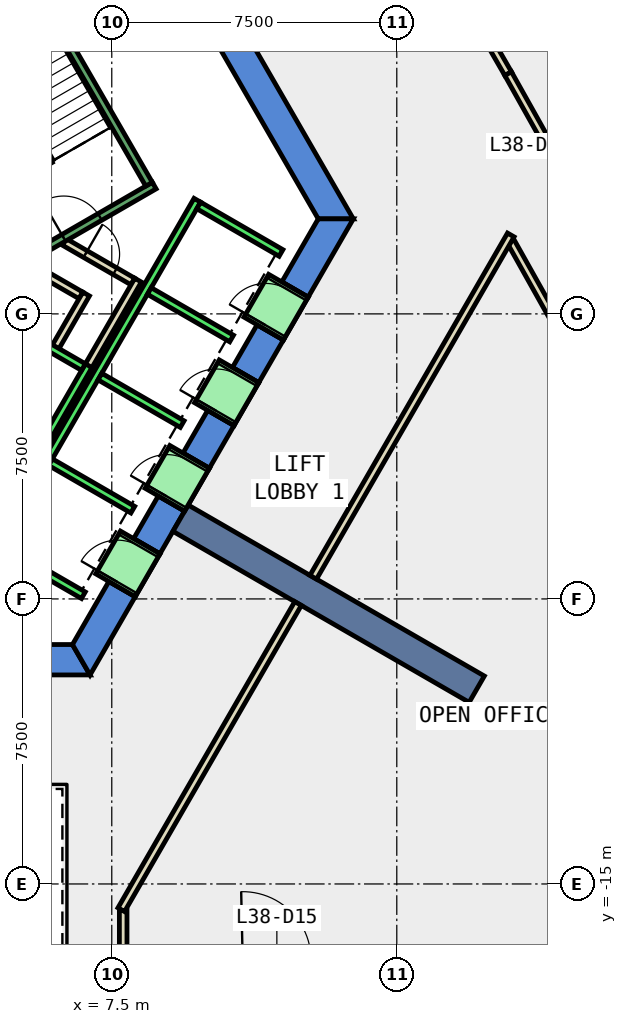
"""IFC4 building model, lengths in metres.
Left out: names, types, materials, properties, quantities, classifications, styles, units other than length and angle.
Written with IfcOpenShell. Run it as: python <this file> out.ifc"""

import sys

from ifc_helpers import new_model, si_unit, direction, frame, frame_2d, origin, place, context, subcontext, project, spatial, polyline, rectangle, outline, extrude, element, fill, save


model = new_model("IFC4")
c1 = context("Model", 3, precision=1e-05, world=origin(), true_north=direction((0.0, 1.0)))
c2 = subcontext(c1, "Body", "Model", "MODEL_VIEW")
j1 = project(units=[si_unit("LENGTHUNIT", "METRE"), si_unit("PLANEANGLEUNIT", "RADIAN")], contexts=[c1])
p1 = place(None, origin())
s1 = spatial("IfcSite", under=j1, at=p1, CompositionType="ELEMENT")
p2 = place(p1, origin())
s2 = spatial("IfcBuilding", under=s1, at=p2, CompositionType="ELEMENT")
p3 = place(p2, frame((0.0, 0.0, 171.8)))
s3 = spatial("IfcBuildingStorey", under=s2, at=p3, CompositionType="ELEMENT", Elevation=171.8)
p4 = place(p3, frame((0.0, 0.0, -0.4)))
e1 = element("IfcWall", 1, at=p4, inside=s3, PredefinedType="SHEAR", context=c2, shape_type="SweptSolid", body=[
    extrude(outline(polyline([(8.517, 11.748), (7.824, 11.348), (12.933, 2.5), (13.856, 2.5), (8.517, 11.748)])), origin(), (0.0, 0.0, 1.0), 4.2),
])
p5 = place(p3, frame((0.0, 0.0, -0.4)))
e2 = element("IfcWall", 2, at=p5, inside=s3, PredefinedType="SHEAR", context=c2, shape_type="SweptSolid", body=[
    extrude(outline(polyline([(5.75, -8.7), (5.75, -9.5), (6.928, -9.5), (6.466, -8.7), (5.75, -8.7)])), origin(), (0.0, 0.0, 1.0), 4.2),
])
p6 = place(p3, frame((0.0, 0.0, -0.4)))
e3 = element("IfcWall", 3, at=p6, inside=s3, PredefinedType="SHEAR", context=c2, shape_type="SweptSolid", body=[
    extrude(outline(polyline([(8.117, -7.44), (7.424, -7.04), (6.466, -8.7), (6.928, -9.5), (8.117, -7.44)])), origin(), (0.0, 0.0, 1.0), 4.2),
])
p7 = place(p3, frame((0.0, 0.0, -0.4)))
e4 = element("IfcWall", 4, at=p7, inside=s3, PredefinedType="SHEAR", context=c2, shape_type="SweptSolid", body=[
    extrude(outline(polyline([(9.417, -5.189), (8.724, -4.789), (8.075, -5.914), (8.767, -6.314), (9.417, -5.189)])), origin(), (0.0, 0.0, 1.0), 4.2),
])
p8 = place(p3, frame((0.0, 0.0, -0.4)))
e5 = element("IfcWall", 5, at=p8, inside=s3, PredefinedType="SHEAR", context=c2, shape_type="SweptSolid", body=[
    extrude(outline(polyline([(10.717, -2.937), (10.025, -2.537), (9.374, -3.663), (10.067, -4.063), (10.717, -2.937)])), origin(), (0.0, 0.0, 1.0), 4.2),
])
p9 = place(p3, frame((0.0, 0.0, -0.4)))
e6 = element("IfcWall", 6, at=p9, inside=s3, PredefinedType="SHEAR", context=c2, shape_type="SweptSolid", body=[
    extrude(outline(polyline([(12.017, -0.686), (11.324, -0.286), (10.675, -1.411), (11.367, -1.811), (12.017, -0.686)])), origin(), (0.0, 0.0, 1.0), 4.2),
])
p10 = place(p3, frame((0.0, 0.0, -0.4)))
e7 = element("IfcWall", 7, at=p10, inside=s3, PredefinedType="SHEAR", context=c2, shape_type="SweptSolid", body=[
    extrude(outline(polyline([(11.974, 0.84), (12.667, 0.44), (13.856, 2.5), (12.933, 2.5), (11.974, 0.84)])), origin(), (0.0, 0.0, 1.0), 4.2),
])
p11 = place(p3, frame((0.0, 0.0, 3.6)))
e8 = element("IfcWall", 8, at=p11, inside=s3, PredefinedType="SHEAR", context=c2, shape_type="SweptSolid", body=[
    extrude(outline(polyline([(8.767, -6.314), (8.075, -5.914), (7.424, -7.04), (8.117, -7.44), (8.767, -6.314)])), origin(), (0.0, 0.0, 1.0), 0.2),
])
p12 = place(p3, frame((0.0, 0.0, 3.6)))
e9 = element("IfcWall", 9, at=p12, inside=s3, PredefinedType="SHEAR", context=c2, shape_type="SweptSolid", body=[
    extrude(outline(polyline([(10.067, -4.063), (9.374, -3.663), (8.724, -4.789), (9.417, -5.189), (10.067, -4.063)])), origin(), (0.0, 0.0, 1.0), 0.2),
])
p13 = place(p3, frame((0.0, 0.0, 3.6)))
e10 = element("IfcWall", 10, at=p13, inside=s3, PredefinedType="SHEAR", context=c2, shape_type="SweptSolid", body=[
    extrude(outline(polyline([(11.367, -1.811), (10.675, -1.411), (10.025, -2.537), (10.717, -2.937), (11.367, -1.811)])), origin(), (0.0, 0.0, 1.0), 0.2),
])
p14 = place(p3, frame((0.0, 0.0, 3.6)))
e11 = element("IfcWall", 11, at=p14, inside=s3, PredefinedType="SHEAR", context=c2, shape_type="SweptSolid", body=[
    extrude(outline(polyline([(12.667, 0.44), (11.974, 0.84), (11.324, -0.286), (12.017, -0.686), (12.667, 0.44)])), origin(), (0.0, 0.0, 1.0), 0.2),
])
p15 = place(p3, frame((9.31, -5.375, -0.4), z_axis=(0.0, 0.0, 1.0), x_axis=(0.866017533419, -0.500013631625, 0.0)))
e12 = element("IfcWall", 12, at=p15, inside=s3, PredefinedType="SHEAR", context=c2, shape_type="SweptSolid", body=[
    extrude(rectangle(XDim=9.0, YDim=0.8, at=frame_2d((4.5, 0.0))), origin(), (0.0, 0.0, 1.0), 4.2),
])
p16 = place(p3, frame((15.987, -16.893, 0.0), z_axis=(0.0, 0.0, 1.0), x_axis=(0.999316060953, 0.036978511606, 0.0)))
e13 = element("IfcWall", 13, at=p16, inside=s3, PredefinedType="PARTITIONING", context=c2, shape_type="SweptSolid", body=[
    extrude(rectangle(XDim=7.355, YDim=0.2, at=frame_2d((3.677, 0.0))), origin(), (0.0, 0.0, 1.0), 3.8),
])
p17 = place(p3, frame((19.506, -0.785, 0.0), z_axis=(0.0, 0.0, 1.0), x_axis=(-0.489049603292, 0.872255974769, 0.0)))
e14 = element("IfcWall", 14, at=p17, inside=s3, PredefinedType="PARTITIONING", context=c2, shape_type="SweptSolid", body=[
    extrude(rectangle(XDim=3.082, YDim=0.2, at=frame_2d((1.541, 0.0))), origin(), (0.0, 0.0, 1.0), 3.8),
])
p18 = place(p3, frame((16.222, 9.28, 0.0), z_axis=(0.0, 0.0, 1.0), x_axis=(0.499920397431, -0.866071357471, 0.0)))
e15 = element("IfcWall", 15, at=p18, inside=s3, PredefinedType="PARTITIONING", context=c2, shape_type="SweptSolid", body=[
    extrude(rectangle(XDim=3.417, YDim=0.2, at=frame_2d((1.708, 0.0))), origin(), (0.0, 0.0, 1.0), 3.8),
])
p19 = place(p3, frame((17.93, 6.321, 0.0), z_axis=(0.0, 0.0, 1.0), x_axis=(0.489044053781, -0.872259086202, 0.0)))
e16 = element("IfcWall", 16, at=p19, inside=s3, PredefinedType="PARTITIONING", context=c2, shape_type="SweptSolid", body=[
    extrude(rectangle(XDim=6.983, YDim=0.2, at=frame_2d((3.492, 0.0))), origin(), (0.0, 0.0, 1.0), 3.8),
])
p20 = place(p19, frame((2.991, 0.0, 0.0)))
e17 = element("IfcOpeningElement", 17, at=p20, cuts=e16, PredefinedType="OPENING", context=c2, shape_type="SweptSolid", body=[
    extrude(rectangle(XDim=1.0, YDim=2.1, at=frame_2d((0.5, 1.05))), frame((0.0, 0.11, 0.0), z_axis=(0.0, -1.0, 0.0), x_axis=(1.0, 0.0, 0.0)), (0.0, 0.0, 1.0), 0.22),
])
p21 = place(p3, frame((5.499, 1.172, 0.0), z_axis=(0.0, 0.0, 1.0), x_axis=(0.866333505267, -0.499465972466, 0.0)))
e18 = element("IfcWall", 18, at=p21, inside=s3, PredefinedType="PARTITIONING", context=c2, shape_type="SweptSolid", body=[
    extrude(rectangle(XDim=1.374, YDim=0.2, at=frame_2d((0.687, 0.0))), origin(), (0.0, 0.0, 1.0), 3.8),
])
p22 = place(p3, frame((6.826, 0.522, 0.0), z_axis=(0.0, 0.0, 1.0), x_axis=(-0.500016722714, -0.866015748706, 0.0)))
e19 = element("IfcWall", 19, at=p22, inside=s3, PredefinedType="PARTITIONING", context=c2, shape_type="SweptSolid", body=[
    extrude(rectangle(XDim=1.7, YDim=0.2, at=frame_2d((0.85, 0.0))), origin(), (0.0, 0.0, 1.0), 3.8),
])
p23 = place(p3, frame((6.25, 1.894, 0.0), z_axis=(0.0, 0.0, 1.0), x_axis=(0.866043184279, -0.499969202016, 0.0)))
e20 = element("IfcWall", 20, at=p23, inside=s3, PredefinedType="PARTITIONING", context=c2, shape_type="SweptSolid", body=[
    extrude(rectangle(XDim=2.084, YDim=0.2, at=frame_2d((1.042, 0.0))), origin(), (0.0, 0.0, 1.0), 3.8),
])
p24 = place(p23, frame((0.642, 0.0, 0.0)))
e21 = element("IfcOpeningElement", 21, at=p24, cuts=e20, PredefinedType="OPENING", context=c2, shape_type="SweptSolid", body=[
    extrude(rectangle(XDim=0.9, YDim=2.1, at=frame_2d((0.45, 1.05))), frame((0.0, 0.11, 0.0), z_axis=(0.0, -1.0, 0.0), x_axis=(1.0, 0.0, 0.0)), (0.0, 0.0, 1.0), 0.22),
])
p25 = place(p3, frame((8.192, 0.888, 0.0), z_axis=(0.0, 0.0, 1.0), x_axis=(-0.499940625693, -0.866059680843, 0.0)))
e22 = element("IfcWall", 22, at=p25, inside=s3, PredefinedType="PARTITIONING", context=c2, shape_type="SweptSolid", body=[
    extrude(rectangle(XDim=2.68, YDim=0.2, at=frame_2d((1.34, 0.0))), origin(), (0.0, 0.0, 1.0), 3.8),
])
p26 = place(p3, frame((7.8, -15.69, 0.0), z_axis=(0.0, 0.0, 1.0), x_axis=(0.0, -1.0, 0.0)))
e23 = element("IfcWall", 23, at=p26, inside=s3, PredefinedType="PARTITIONING", context=c2, shape_type="SweptSolid", body=[
    extrude(rectangle(XDim=1.281, YDim=0.2, at=frame_2d((0.641, 0.0))), origin(), (0.0, 0.0, 1.0), 3.8),
])
p27 = place(p3, frame((18.0, 2.077, 0.0), z_axis=(0.0, 0.0, 1.0), x_axis=(-0.499959557847, -0.866048751813, 0.0)))
e24 = element("IfcWall", 24, at=p27, inside=s3, PredefinedType="PARTITIONING", context=c2, shape_type="SweptSolid", body=[
    extrude(rectangle(XDim=10.399, YDim=0.2, at=frame_2d((5.199, 0.0))), origin(), (0.0, 0.0, 1.0), 3.8),
])
p28 = place(p3, frame((12.401, -7.621, 0.0), z_axis=(0.0, 0.0, 1.0), x_axis=(-0.499983724212, -0.866034800411, 0.0)))
e25 = element("IfcWall", 25, at=p28, inside=s3, PredefinedType="PARTITIONING", context=c2, shape_type="SweptSolid", body=[
    extrude(rectangle(XDim=9.302, YDim=0.2, at=frame_2d((4.651, 0.0))), origin(), (0.0, 0.0, 1.0), 3.8),
])
p29 = place(p3, frame((5.492, -3.788, 0.0), z_axis=(0.0, 0.0, 1.0), x_axis=(0.500011755427, 0.866018616679, 0.0)))
e26 = element("IfcWall", 26, at=p29, inside=s3, PredefinedType="STANDARD", context=c2, shape_type="SweptSolid", body=[
    extrude(rectangle(XDim=2.8, YDim=0.2, at=frame_2d((1.4, 0.0))), origin(), (0.0, 0.0, 1.0), 3.8),
])
p30 = place(p3, frame((4.677, -0.2, 0.0), z_axis=(0.0, 0.0, 1.0), x_axis=(0.865973769406, -0.500089422704, 0.0)))
e27 = element("IfcWall", 27, at=p30, inside=s3, PredefinedType="STANDARD", context=c2, shape_type="SweptSolid", body=[
    extrude(rectangle(XDim=2.399, YDim=0.2, at=frame_2d((1.2, 0.0))), origin(), (0.0, 0.0, 1.0), 3.8),
])
p31 = place(p3, frame((4.451, -6.19, 0.0), z_axis=(0.0, 0.0, 1.0), x_axis=(0.50000090737, 0.866024879913, 0.0)))
e28 = element("IfcWall", 28, at=p31, inside=s3, PredefinedType="STANDARD", context=c2, shape_type="SweptSolid", body=[
    extrude(rectangle(XDim=10.6, YDim=0.2, at=frame_2d((5.3, 0.0))), origin(), (0.0, 0.0, 1.0), 3.8),
])
for number, where, z_axis, x_axis in (
    (29, (4.588, -6.153, 0.0), (0.0, 0.0, 1.0), (0.866, -0.5, 0.0)),
    (30, (5.888, -3.902, 0.0), (0.0, 0.0, 1.0), (0.866, -0.5, 0.0)),
    (31, (7.188, -1.65, 0.0), (0.0, 0.0, 1.0), (0.866, -0.5, 0.0)),
    (32, (8.488, 0.602, 0.0), (0.0, 0.0, 1.0), (0.866, -0.5, 0.0)),
):
    element("IfcWall", number, at=place(p3, frame(where, z_axis=z_axis, x_axis=x_axis)), inside=s3, PredefinedType="STANDARD", context=c2, shape_type="SweptSolid", body=[
        extrude(rectangle(XDim=2.5, YDim=0.2, at=frame_2d((1.25, 0.0))), origin(), (0.0, 0.0, 1.0), 3.8),
    ])
p32 = place(p3, frame((9.788, 2.853, 0.0), z_axis=(0.0, 0.0, 1.0), x_axis=(0.865998541277, -0.500046524342, 0.0)))
e33 = element("IfcWall", 33, at=p32, inside=s3, PredefinedType="STANDARD", context=c2, shape_type="SweptSolid", body=[
    extrude(rectangle(XDim=2.5, YDim=0.2, at=frame_2d((1.25, 0.0))), origin(), (0.0, 0.0, 1.0), 3.8),
])
p33 = place(p3, frame((7.598, -7.14, 0.0), z_axis=(0.0, 0.0, 1.0), x_axis=(0.500362116554, 0.865816234728, 0.0)))
e34 = element("IfcWall", 34, at=p33, inside=s3, PredefinedType="STANDARD", context=c2, shape_type="SweptSolid", body=[
    extrude(rectangle(XDim=1.299, YDim=1.2, at=frame_2d((0.65, 0.0))), origin(), (0.0, 0.0, 1.0), 2.4),
])
p34 = place(p33, frame((0.1, 0.0, 0.0)))
e35 = element("IfcOpeningElement", 35, at=p34, cuts=e34, PredefinedType="OPENING", context=c2, shape_type="SweptSolid", body=[
    extrude(rectangle(XDim=1.1, YDim=2.3, at=frame_2d((0.55, 1.15))), frame((0.0, 0.61, 0.0), z_axis=(0.0, -1.0, 0.0), x_axis=(1.0, 0.0, 0.0)), (0.0, 0.0, 1.0), 1.22),
])
p35 = place(p3, frame((8.898, -4.889, 0.0), z_axis=(0.0, 0.0, 1.0), x_axis=(0.500036693733, 0.866004217611, 0.0)))
e36 = element("IfcWall", 36, at=p35, inside=s3, PredefinedType="STANDARD", context=c2, shape_type="SweptSolid", body=[
    extrude(rectangle(XDim=1.3, YDim=1.2, at=frame_2d((0.65, 0.0))), origin(), (0.0, 0.0, 1.0), 2.4),
])
p36 = place(p35, frame((0.1, 0.0, 0.0)))
e37 = element("IfcOpeningElement", 37, at=p36, cuts=e36, PredefinedType="OPENING", context=c2, shape_type="SweptSolid", body=[
    extrude(rectangle(XDim=1.1, YDim=2.3, at=frame_2d((0.55, 1.15))), frame((0.0, 0.61, 0.0), z_axis=(0.0, -1.0, 0.0), x_axis=(1.0, 0.0, 0.0)), (0.0, 0.0, 1.0), 1.22),
])
p37 = place(p3, frame((10.198, -2.637, 0.0), z_axis=(0.0, 0.0, 1.0), x_axis=(0.49989585183, 0.866085525409, 0.0)))
e38 = element("IfcWall", 38, at=p37, inside=s3, PredefinedType="STANDARD", context=c2, shape_type="SweptSolid", body=[
    extrude(rectangle(XDim=1.3, YDim=1.2, at=frame_2d((0.65, 0.0))), origin(), (0.0, 0.0, 1.0), 2.4),
])
p38 = place(p37, frame((0.1, 0.0, 0.0)))
e39 = element("IfcOpeningElement", 39, at=p38, cuts=e38, PredefinedType="OPENING", context=c2, shape_type="SweptSolid", body=[
    extrude(rectangle(XDim=1.1, YDim=2.3, at=frame_2d((0.55, 1.15))), frame((0.0, 0.61, 0.0), z_axis=(0.0, -1.0, 0.0), x_axis=(1.0, 0.0, 0.0)), (0.0, 0.0, 1.0), 1.22),
])
p39 = place(p3, frame((11.498, -0.385, 0.0), z_axis=(0.0, 0.0, 1.0), x_axis=(0.500221244143, 0.865897630733, 0.0)))
e40 = element("IfcWall", 40, at=p39, inside=s3, PredefinedType="STANDARD", context=c2, shape_type="SweptSolid", body=[
    extrude(rectangle(XDim=1.299, YDim=1.2, at=frame_2d((0.65, 0.0))), origin(), (0.0, 0.0, 1.0), 2.4),
])
p40 = place(p39, frame((0.1, 0.0, 0.0)))
e41 = element("IfcOpeningElement", 41, at=p40, cuts=e40, PredefinedType="OPENING", context=c2, shape_type="SweptSolid", body=[
    extrude(rectangle(XDim=1.1, YDim=2.3, at=frame_2d((0.55, 1.15))), frame((0.0, 0.61, 0.0), z_axis=(0.0, -1.0, 0.0), x_axis=(1.0, 0.0, 0.0)), (0.0, 0.0, 1.0), 1.22),
])
p41 = place(p3, frame((4.806, 1.176, 0.0), z_axis=(0.0, 0.0, 1.0), x_axis=(0.866059941101, 0.499940174841, 0.0)))
e42 = element("IfcWall", 42, at=p41, inside=s3, PredefinedType="STANDARD", context=c2, shape_type="SweptSolid", body=[
    extrude(rectangle(XDim=4.4, YDim=0.2, at=frame_2d((2.2, 0.0))), origin(), (0.0, 0.0, 1.0), 3.8),
])
p42 = place(p41, frame((1.65, 0.0, 0.0)))
e43 = element("IfcOpeningElement", 43, at=p42, cuts=e42, PredefinedType="OPENING", context=c2, shape_type="SweptSolid", body=[
    extrude(rectangle(XDim=1.1, YDim=2.2, at=frame_2d((0.55, 1.1))), frame((0.0, 0.11, 0.0), z_axis=(0.0, -1.0, 0.0), x_axis=(1.0, 0.0, 0.0)), (0.0, 0.0, 1.0), 0.22),
])
p43 = place(p3, frame((8.48, 3.412, 0.0), z_axis=(0.0, 0.0, 1.0), x_axis=(-0.499978703459, 0.866037698999, 0.0)))
e44 = element("IfcWall", 44, at=p43, inside=s3, PredefinedType="STANDARD", context=c2, shape_type="SweptSolid", body=[
    extrude(rectangle(XDim=6.9, YDim=0.2, at=frame_2d((3.45, 0.0))), origin(), (0.0, 0.0, 1.0), 3.8),
])
p44 = place(p24, origin())
e45 = element("IfcDoor", 45, at=p44, inside=s3, OperationType="SINGLE_SWING_LEFT", PredefinedType="DOOR", context=c2, shape_type="SweptSolid", body=[
    extrude(rectangle(XDim=0.9, YDim=2.1, at=frame_2d((0.45, 1.05))), frame((0.0, 0.025, 0.0), z_axis=(0.0, -1.0, 0.0), x_axis=(1.0, 0.0, 0.0)), (0.0, 0.0, 1.0), 0.05),
])
fill(e21, e45)
p45 = place(p34, origin())
e46 = element("IfcDoor", 46, at=p45, inside=s3, OperationType="SLIDING_TO_LEFT", PredefinedType="DOOR", context=c2, shape_type="SweptSolid", body=[
    extrude(rectangle(XDim=1.1, YDim=2.3, at=frame_2d((0.55, 1.15))), frame((0.0, 0.025, 0.0), z_axis=(0.0, -1.0, 0.0), x_axis=(1.0, 0.0, 0.0)), (0.0, 0.0, 1.0), 0.05),
])
fill(e35, e46)
p46 = place(p36, origin())
e47 = element("IfcDoor", 47, at=p46, inside=s3, OperationType="SLIDING_TO_LEFT", PredefinedType="DOOR", context=c2, shape_type="SweptSolid", body=[
    extrude(rectangle(XDim=1.1, YDim=2.3, at=frame_2d((0.55, 1.15))), frame((0.0, 0.025, 0.0), z_axis=(0.0, -1.0, 0.0), x_axis=(1.0, 0.0, 0.0)), (0.0, 0.0, 1.0), 0.05),
])
fill(e37, e47)
p47 = place(p38, origin())
e48 = element("IfcDoor", 48, at=p47, inside=s3, OperationType="SLIDING_TO_LEFT", PredefinedType="DOOR", context=c2, shape_type="SweptSolid", body=[
    extrude(rectangle(XDim=1.1, YDim=2.3, at=frame_2d((0.55, 1.15))), frame((0.0, 0.025, 0.0), z_axis=(0.0, -1.0, 0.0), x_axis=(1.0, 0.0, 0.0)), (0.0, 0.0, 1.0), 0.05),
])
fill(e39, e48)
p48 = place(p40, origin())
e49 = element("IfcDoor", 49, at=p48, inside=s3, OperationType="SLIDING_TO_LEFT", PredefinedType="DOOR", context=c2, shape_type="SweptSolid", body=[
    extrude(rectangle(XDim=1.1, YDim=2.3, at=frame_2d((0.55, 1.15))), frame((0.0, 0.025, 0.0), z_axis=(0.0, -1.0, 0.0), x_axis=(1.0, 0.0, 0.0)), (0.0, 0.0, 1.0), 0.05),
])
fill(e41, e49)
p49 = place(p42, origin())
e50 = element("IfcDoor", 50, at=p49, inside=s3, OperationType="SINGLE_SWING_LEFT", PredefinedType="DOOR", context=c2, shape_type="SweptSolid", body=[
    extrude(rectangle(XDim=1.1, YDim=2.2, at=frame_2d((0.55, 1.1))), frame((0.0, 0.025, 0.0), z_axis=(0.0, -1.0, 0.0), x_axis=(1.0, 0.0, 0.0)), (0.0, 0.0, 1.0), 0.05),
])
fill(e43, e50)
save(model, sys.argv[1])
